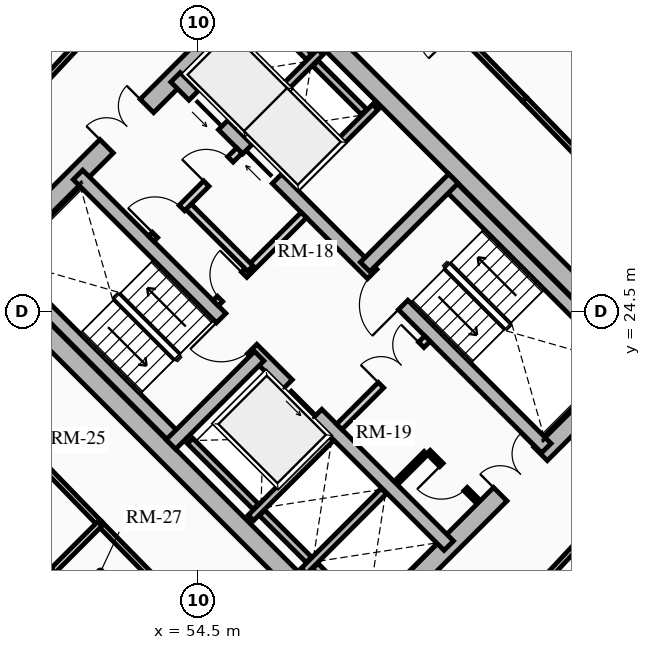
"""IFC4 building model, lengths in metres.
Left out: names, types, materials, properties, quantities, classifications, styles, units other than length and angle.
Written with IfcOpenShell. Run it as: python <this file> out.ifc"""

import sys

from ifc_helpers import new_model, si_unit, direction, frame, frame_2d, origin, place, context, subcontext, project, spatial, rectangle, extrude, source, transform, mapped, element, fill, save


model = new_model("IFC4")
c1 = context("Model", 3, precision=1e-05, world=origin(), true_north=direction((0.0, 1.0)))
c2 = subcontext(c1, "Body", "Model", "MODEL_VIEW")
j1 = project(units=[si_unit("LENGTHUNIT", "METRE"), si_unit("PLANEANGLEUNIT", "RADIAN")], contexts=[c1])
p1 = place(None, origin())
s1 = spatial("IfcSite", under=j1, at=p1, CompositionType="ELEMENT")
p2 = place(p1, origin())
s2 = spatial("IfcBuilding", under=s1, at=p2, CompositionType="ELEMENT")
p3 = place(p2, frame((0.0, 0.0, 22.0)))
s3 = spatial("IfcBuildingStorey", under=s2, at=p3, CompositionType="ELEMENT", Elevation=22.0)
for number, where, z_axis, x_axis in (
    (1, (58.773, 15.661, 0.0), (0.0, 0.0, 1.0), (-0.707, 0.707, 0.0)),
    (2, (66.339, 23.227, 0.0), (0.0, 0.0, 1.0), (-0.707, 0.707, 0.0)),
):
    element("IfcWall", number, at=place(p3, frame(where, z_axis=z_axis, x_axis=x_axis)), inside=s3, PredefinedType="SHEAR", context=c2, shape_type="SweptSolid", body=[
        extrude(rectangle(XDim=14.3, YDim=0.5, at=frame_2d((7.15, 0.0))), origin(), (0.0, 0.0, 1.0), 2.91),
    ])
p4 = place(p3, frame((58.596, 15.838, 0.0), z_axis=(0.0, 0.0, 1.0), x_axis=(0.707106781187, 0.707106781187, 0.0)))
e3 = element("IfcWall", 3, at=p4, inside=s3, PredefinedType="SHEAR", context=c2, shape_type="SweptSolid", body=[
    extrude(rectangle(XDim=10.7, YDim=0.5, at=frame_2d((5.35, 0.0))), origin(), (0.0, 0.0, 1.0), 2.91),
])
m1 = source(origin(), c2, "Body", "SweptSolid", [
    extrude(rectangle(XDim=1.5, YDim=2.02, at=frame_2d((0.75, 1.01))), frame((0.0, 0.26, 0.0), z_axis=(0.0, -1.0, 0.0), x_axis=(1.0, 0.0, 0.0)), (0.0, 0.0, 1.0), 0.52),
])
p5 = place(p4, frame((5.45, 0.0, 0.0)))
e4 = element("IfcOpeningElement", 4, at=p5, cuts=e3, PredefinedType="OPENING", context=c2, shape_type="MappedRepresentation", body=[
    mapped(m1, transform((0.0, 0.0, 0.0), x_axis=(1.0, 0.0, 0.0), y_axis=(0.0, 1.0, 0.0), z_axis=(0.0, 0.0, 1.0), scale=1.0)),
])
p6 = place(p3, frame((48.838, 25.596, 0.0), z_axis=(0.0, 0.0, 1.0), x_axis=(0.707106781187, 0.707106781187, 0.0)))
e5 = element("IfcWall", 5, at=p6, inside=s3, PredefinedType="SHEAR", context=c2, shape_type="SweptSolid", body=[
    extrude(rectangle(XDim=10.7, YDim=0.5, at=frame_2d((5.35, 0.0))), origin(), (0.0, 0.0, 1.0), 2.91),
])
p7 = place(p6, frame((4.6, 0.0, 0.0)))
e6 = element("IfcOpeningElement", 6, at=p7, cuts=e5, PredefinedType="OPENING", context=c2, shape_type="MappedRepresentation", body=[
    mapped(m1, transform((0.0, 0.0, 0.0), x_axis=(1.0, 0.0, 0.0), y_axis=(0.0, 1.0, 0.0), z_axis=(0.0, 0.0, 1.0), scale=1.0)),
])
p8 = place(p3, frame((61.096, 18.338, 0.0), z_axis=(0.0, 0.0, 1.0), x_axis=(-0.707106781187, 0.707106781187, 0.0)))
e7 = element("IfcWall", 7, at=p8, inside=s3, PredefinedType="SHEAR", context=c2, shape_type="SweptSolid", body=[
    extrude(rectangle(XDim=13.8, YDim=0.35, at=frame_2d((6.9, 0.0))), origin(), (0.0, 0.0, 1.0), 2.91),
])
m2 = source(origin(), c2, "Body", "SweptSolid", [
    extrude(rectangle(XDim=1.1, YDim=2.015, at=frame_2d((0.55, 1.007))), frame((0.0, 0.185, 0.0), z_axis=(0.0, -1.0, 0.0), x_axis=(1.0, 0.0, 0.0)), (0.0, 0.0, 1.0), 0.37),
])
p9 = place(p8, frame((4.9, 0.0, 0.0)))
e8 = element("IfcOpeningElement", 8, at=p9, cuts=e7, PredefinedType="OPENING", context=c2, shape_type="MappedRepresentation", body=[
    mapped(m2, transform((0.0, 0.0, 0.0), x_axis=(1.0, 0.0, 0.0), y_axis=(0.0, 1.0, 0.0), z_axis=(0.0, 0.0, 1.0), scale=1.0)),
])
m3 = source(origin(), c2, "Body", "SweptSolid", [
    extrude(rectangle(XDim=1.15, YDim=2.02, at=frame_2d((0.575, 1.01))), frame((0.0, 0.185, 0.0), z_axis=(0.0, -1.0, 0.0), x_axis=(1.0, 0.0, 0.0)), (0.0, 0.0, 1.0), 0.37),
])
p10 = place(p8, frame((7.32, 0.0, 0.0)))
e9 = element("IfcOpeningElement", 9, at=p10, cuts=e7, PredefinedType="OPENING", context=c2, shape_type="MappedRepresentation", body=[
    mapped(m3, transform((0.0, 0.0, 0.0), x_axis=(1.0, 0.0, 0.0), y_axis=(0.0, 1.0, 0.0), z_axis=(0.0, 0.0, 1.0), scale=1.0)),
])
p11 = place(p3, frame((63.662, 20.904, 0.0), z_axis=(0.0, 0.0, 1.0), x_axis=(-0.707106781187, 0.707106781187, 0.0)))
e10 = element("IfcWall", 10, at=p11, inside=s3, PredefinedType="SHEAR", context=c2, shape_type="SweptSolid", body=[
    extrude(rectangle(XDim=13.8, YDim=0.35, at=frame_2d((6.9, 0.0))), origin(), (0.0, 0.0, 1.0), 2.91),
])
p12 = place(p11, frame((10.025, 0.0, 0.0)))
e11 = element("IfcOpeningElement", 11, at=p12, cuts=e10, PredefinedType="OPENING", context=c2, shape_type="MappedRepresentation", body=[
    mapped(m2, transform((0.0, 0.0, 0.0), x_axis=(1.0, 0.0, 0.0), y_axis=(0.0, 1.0, 0.0), z_axis=(0.0, 0.0, 1.0), scale=1.0)),
])
p13 = place(p11, frame((12.025, 0.0, 0.0)))
e12 = element("IfcOpeningElement", 12, at=p13, cuts=e10, PredefinedType="OPENING", context=c2, shape_type="MappedRepresentation", body=[
    mapped(m2, transform((0.0, 0.0, 0.0), x_axis=(1.0, 0.0, 0.0), y_axis=(0.0, 1.0, 0.0), z_axis=(0.0, 0.0, 1.0), scale=1.0)),
])
p14 = place(p11, frame((5.33, 0.0, 0.0)))
e13 = element("IfcOpeningElement", 13, at=p14, cuts=e10, PredefinedType="OPENING", context=c2, shape_type="MappedRepresentation", body=[
    mapped(m3, transform((0.0, 0.0, 0.0), x_axis=(1.0, 0.0, 0.0), y_axis=(0.0, 1.0, 0.0), z_axis=(0.0, 0.0, 1.0), scale=1.0)),
])
p15 = place(p3, frame((53.922, 21.141, 0.0), z_axis=(0.0, 0.0, 1.0), x_axis=(-0.707106781187, 0.707106781187, 0.0)))
e14 = element("IfcWall", 14, at=p15, inside=s3, PredefinedType="SHEAR", context=c2, shape_type="SweptSolid", body=[
    extrude(rectangle(XDim=6.745, YDim=0.35, at=frame_2d((3.373, 0.0))), origin(), (0.0, 0.0, 1.0), 2.91),
])
p16 = place(p3, frame((53.784, 21.003, 0.0), z_axis=(0.0, 0.0, 1.0), x_axis=(0.707106781187, 0.707106781187, 0.0)))
e15 = element("IfcWall", 15, at=p16, inside=s3, PredefinedType="SHEAR", context=c2, shape_type="SweptSolid", body=[
    extrude(rectangle(XDim=3.285, YDim=0.35, at=frame_2d((1.643, 0.0))), origin(), (0.0, 0.0, 1.0), 2.91),
])
p17 = place(p3, frame((65.847, 23.089, 0.0), z_axis=(0.0, 0.0, 1.0), x_axis=(-0.707106781187, 0.707106781187, 0.0)))
e16 = element("IfcWall", 16, at=p17, inside=s3, PredefinedType="SHEAR", context=c2, shape_type="SweptSolid", body=[
    extrude(rectangle(XDim=6.745, YDim=0.35, at=frame_2d((3.373, 0.0))), origin(), (0.0, 0.0, 1.0), 2.91),
])
p18 = place(p3, frame((58.893, 25.674, 0.0), z_axis=(0.0, 0.0, 1.0), x_axis=(0.707106781187, 0.707106781187, 0.0)))
e17 = element("IfcWall", 17, at=p18, inside=s3, PredefinedType="SHEAR", context=c2, shape_type="SweptSolid", body=[
    extrude(rectangle(XDim=3.285, YDim=0.35, at=frame_2d((1.643, 0.0))), origin(), (0.0, 0.0, 1.0), 2.91),
])
p19 = place(p3, frame((55.888, 19.069, 0.0), z_axis=(0.0, 0.0, 1.0), x_axis=(0.707106781187, 0.707106781187, 0.0)))
e18 = element("IfcWall", 18, at=p19, inside=s3, PredefinedType="SHEAR", context=c2, shape_type="SweptSolid", body=[
    extrude(rectangle(XDim=2.97, YDim=0.2, at=frame_2d((1.485, 0.0))), origin(), (0.0, 0.0, 1.0), 2.91),
])
p20 = place(p3, frame((56.015, 19.366, 0.0), z_axis=(0.0, 0.0, 1.0), x_axis=(-0.707106781187, 0.707106781187, 0.0)))
e19 = element("IfcWall", 19, at=p20, inside=s3, PredefinedType="SHEAR", context=c2, shape_type="SweptSolid", body=[
    extrude(rectangle(XDim=2.44, YDim=0.2, at=frame_2d((1.22, 0.0))), origin(), (0.0, 0.0, 1.0), 2.91),
])
p21 = place(p3, frame((57.284, 17.673, 0.0), z_axis=(0.0, 0.0, 1.0), x_axis=(0.707147878904, 0.70706568108, 0.0)))
e20 = element("IfcWall", 20, at=p21, inside=s3, PredefinedType="SHEAR", context=c2, shape_type="SweptSolid", body=[
    extrude(rectangle(XDim=2.97, YDim=0.2, at=frame_2d((1.485, 0.0))), origin(), (0.0, 0.0, 1.0), 2.91),
])
p22 = place(p3, frame((57.412, 17.97, 0.0), z_axis=(0.0, 0.0, 1.0), x_axis=(-0.707106781187, 0.707106781187, 0.0)))
e21 = element("IfcWall", 21, at=p22, inside=s3, PredefinedType="SHEAR", context=c2, shape_type="SweptSolid", body=[
    extrude(rectangle(XDim=1.735, YDim=0.2, at=frame_2d((0.867, 0.0))), origin(), (0.0, 0.0, 1.0), 2.91),
])
p23 = place(p3, frame((58.737, 16.644, 0.0), z_axis=(0.0, 0.0, 1.0), x_axis=(-0.707032117043, 0.707181437447, 0.0)))
e22 = element("IfcWall", 22, at=p23, inside=s3, PredefinedType="SHEAR", context=c2, shape_type="SweptSolid", body=[
    extrude(rectangle(XDim=1.635, YDim=0.2, at=frame_2d((0.817, 0.0))), origin(), (0.0, 0.0, 1.0), 2.91),
])
p24 = place(p3, frame((57.062, 27.781, 0.0), z_axis=(0.0, 0.0, 1.0), x_axis=(0.707106781187, 0.707106781187, 0.0)))
e23 = element("IfcWall", 23, at=p24, inside=s3, PredefinedType="SHEAR", context=c2, shape_type="SweptSolid", body=[
    extrude(rectangle(XDim=2.97, YDim=0.2, at=frame_2d((1.485, 0.0))), origin(), (0.0, 0.0, 1.0), 2.91),
])
p25 = place(p3, frame((55.615, 29.227, 0.0), z_axis=(0.0, 0.0, 1.0), x_axis=(0.707147878904, 0.70706568108, 0.0)))
e24 = element("IfcWall", 24, at=p25, inside=s3, PredefinedType="SHEAR", context=c2, shape_type="SweptSolid", body=[
    extrude(rectangle(XDim=2.97, YDim=0.2, at=frame_2d((1.485, 0.0))), origin(), (0.0, 0.0, 1.0), 2.91),
])
p26 = place(p3, frame((58.865, 29.754, 0.0), z_axis=(0.0, 0.0, 1.0), x_axis=(-0.707174411312, 0.707039144592, 0.0)))
e25 = element("IfcWall", 25, at=p26, inside=s3, PredefinedType="SHEAR", context=c2, shape_type="SweptSolid", body=[
    extrude(rectangle(XDim=1.805, YDim=0.2, at=frame_2d((0.902, 0.0))), origin(), (0.0, 0.0, 1.0), 2.91),
])
p27 = place(p3, frame((57.419, 31.2, 0.0), z_axis=(0.0, 0.0, 1.0), x_axis=(-0.707032117043, 0.707181437447, 0.0)))
e26 = element("IfcWall", 26, at=p27, inside=s3, PredefinedType="SHEAR", context=c2, shape_type="SweptSolid", body=[
    extrude(rectangle(XDim=1.635, YDim=0.2, at=frame_2d((0.817, 0.0))), origin(), (0.0, 0.0, 1.0), 2.91),
])
p28 = place(p3, frame((58.214, 21.467, 0.0), z_axis=(0.0, 0.0, 1.0), x_axis=(0.707106781187, 0.707106781187, 0.0)))
e27 = element("IfcWall", 27, at=p28, inside=s3, PredefinedType="PARTITIONING", context=c2, shape_type="SweptSolid", body=[
    extrude(rectangle(XDim=3.28, YDim=0.2, at=frame_2d((1.64, 0.0))), origin(), (0.0, 0.0, 1.0), 2.635),
])
m4 = source(origin(), c2, "Body", "SweptSolid", [
    extrude(rectangle(XDim=1.5, YDim=2.02, at=frame_2d((0.75, 1.01))), frame((0.0, 0.11, 0.0), z_axis=(0.0, -1.0, 0.0), x_axis=(1.0, 0.0, 0.0)), (0.0, 0.0, 1.0), 0.22),
])
p29 = place(p28, frame((1.55, 0.0, 0.0)))
e28 = element("IfcOpeningElement", 28, at=p29, cuts=e27, PredefinedType="OPENING", context=c2, shape_type="MappedRepresentation", body=[
    mapped(m4, transform((0.0, 0.0, 0.0), x_axis=(1.0, 0.0, 0.0), y_axis=(0.0, 1.0, 0.0), z_axis=(0.0, 0.0, 1.0), scale=1.0)),
])
p30 = place(p3, frame((54.961, 24.719, 0.0), z_axis=(0.0, 0.0, 1.0), x_axis=(0.707106781187, 0.707106781187, 0.0)))
e29 = element("IfcWall", 29, at=p30, inside=s3, PredefinedType="PARTITIONING", context=c2, shape_type="SweptSolid", body=[
    extrude(rectangle(XDim=3.28, YDim=0.2, at=frame_2d((1.64, 0.0))), origin(), (0.0, 0.0, 1.0), 2.635),
])
m5 = source(origin(), c2, "Body", "SweptSolid", [
    extrude(rectangle(XDim=0.9, YDim=2.005, at=frame_2d((0.45, 1.002))), frame((0.0, 0.11, 0.0), z_axis=(0.0, -1.0, 0.0), x_axis=(1.0, 0.0, 0.0)), (0.0, 0.0, 1.0), 0.22),
])
p31 = place(p30, frame((0.16, 0.0, 0.0)))
e30 = element("IfcOpeningElement", 30, at=p31, cuts=e29, PredefinedType="OPENING", context=c2, shape_type="MappedRepresentation", body=[
    mapped(m5, transform((0.0, 0.0, 0.0), x_axis=(1.0, 0.0, 0.0), y_axis=(0.0, 1.0, 0.0), z_axis=(0.0, 0.0, 1.0), scale=1.0)),
])
p32 = place(p3, frame((55.874, 25.631, 0.0), z_axis=(0.0, 0.0, 1.0), x_axis=(-0.707157639372, 0.707055919343, 0.0)))
e31 = element("IfcWall", 31, at=p32, inside=s3, PredefinedType="PARTITIONING", context=c2, shape_type="SweptSolid", body=[
    extrude(rectangle(XDim=2.4, YDim=0.2, at=frame_2d((1.2, 0.0))), origin(), (0.0, 0.0, 1.0), 2.635),
])
p33 = place(p3, frame((53.264, 26.416, 0.0), z_axis=(0.0, 0.0, 1.0), x_axis=(0.707106781187, 0.707106781187, 0.0)))
e32 = element("IfcWall", 32, at=p33, inside=s3, PredefinedType="PARTITIONING", context=c2, shape_type="SweptSolid", body=[
    extrude(rectangle(XDim=3.28, YDim=0.2, at=frame_2d((1.64, 0.0))), origin(), (0.0, 0.0, 1.0), 2.635),
])
m6 = source(origin(), c2, "Body", "SweptSolid", [
    extrude(rectangle(XDim=1.0, YDim=2.015, at=frame_2d((0.5, 1.007))), frame((0.0, 0.11, 0.0), z_axis=(0.0, -1.0, 0.0), x_axis=(1.0, 0.0, 0.0)), (0.0, 0.0, 1.0), 0.22),
])
p34 = place(p33, frame((0.14, 0.0, 0.0)))
e33 = element("IfcOpeningElement", 33, at=p34, cuts=e32, PredefinedType="OPENING", context=c2, shape_type="MappedRepresentation", body=[
    mapped(m6, transform((0.0, 0.0, 0.0), x_axis=(1.0, 0.0, 0.0), y_axis=(0.0, 1.0, 0.0), z_axis=(0.0, 0.0, 1.0), scale=1.0)),
])
p35 = place(p33, frame((2.05, 0.0, 0.0)))
e34 = element("IfcOpeningElement", 34, at=p35, cuts=e32, PredefinedType="OPENING", context=c2, shape_type="MappedRepresentation", body=[
    mapped(m5, transform((0.0, 0.0, 0.0), x_axis=(1.0, 0.0, 0.0), y_axis=(0.0, 1.0, 0.0), z_axis=(0.0, 0.0, 1.0), scale=1.0)),
])
p36 = place(p3, frame((61.835, 19.529, 0.0), z_axis=(0.0, 0.0, 1.0), x_axis=(-0.707174592913, 0.707038962956, 0.0)))
e35 = element("IfcWall", 35, at=p36, inside=s3, PredefinedType="PARTITIONING", context=c2, shape_type="SweptSolid", body=[
    extrude(rectangle(XDim=1.8, YDim=0.125, at=frame_2d((0.9, 0.0))), origin(), (0.0, 0.0, 1.0), 2.635),
])
m7 = source(origin(), c2, "Body", "SweptSolid", [
    extrude(rectangle(XDim=0.9, YDim=2.005, at=frame_2d((0.45, 1.002))), frame((0.0, 0.073, 0.0), z_axis=(0.0, -1.0, 0.0), x_axis=(1.0, 0.0, 0.0)), (0.0, 0.0, 1.0), 0.145),
])
p37 = place(p36, frame((0.42, 0.0, 0.0)))
e36 = element("IfcOpeningElement", 36, at=p37, cuts=e35, PredefinedType="OPENING", context=c2, shape_type="MappedRepresentation", body=[
    mapped(m7, transform((0.0, 0.0, 0.0), x_axis=(1.0, 0.0, 0.0), y_axis=(0.0, 1.0, 0.0), z_axis=(0.0, 0.0, 1.0), scale=1.0)),
])
p38 = place(p3, frame((59.713, 19.996, 0.0), z_axis=(0.0, 0.0, 1.0), x_axis=(0.707217726, 0.706995818963, 0.0)))
e37 = element("IfcWall", 37, at=p38, inside=s3, PredefinedType="PARTITIONING", context=c2, shape_type="SweptSolid", body=[
    extrude(rectangle(XDim=1.1, YDim=0.125, at=frame_2d((0.55, 0.0))), origin(), (0.0, 0.0, 1.0), 2.635),
])
p39 = place(p3, frame((63.086, 30.086, 0.0), z_axis=(0.0, 0.0, 1.0), x_axis=(-0.699075897379, 0.715047473741, 0.0)))
e38 = element("IfcWall", 38, at=p39, inside=s3, PredefinedType="PARTITIONING", context=c2, shape_type="SweptSolid", body=[
    extrude(rectangle(XDim=6.114, YDim=0.15, at=frame_2d((3.057, 0.0))), origin(), (0.0, 0.0, 1.0), 2.159),
])
m8 = source(origin(), c2, "Body", "SweptSolid", [
    extrude(rectangle(XDim=1.05, YDim=2.015, at=frame_2d((0.525, 1.007))), frame((0.0, 0.085, 0.0), z_axis=(0.0, -1.0, 0.0), x_axis=(1.0, 0.0, 0.0)), (0.0, 0.0, 1.0), 0.17),
])
p40 = place(p39, frame((2.532, 0.0, 0.0)))
e39 = element("IfcOpeningElement", 39, at=p40, cuts=e38, PredefinedType="OPENING", context=c2, shape_type="MappedRepresentation", body=[
    mapped(m8, transform((0.0, 0.0, 0.0), x_axis=(1.0, 0.0, 0.0), y_axis=(0.0, 1.0, 0.0), z_axis=(0.0, 0.0, 1.0), scale=1.0)),
])
p41 = place(p3, frame((52.043, 32.28, 0.0), z_axis=(0.0, 0.0, 1.0), x_axis=(-0.682606081633, -0.730786519661, 0.0)))
e40 = element("IfcWall", 40, at=p41, inside=s3, PredefinedType="PARTITIONING", context=c2, shape_type="SweptSolid", body=[
    extrude(rectangle(XDim=6.527, YDim=0.15, at=frame_2d((3.263, 0.0))), origin(), (0.0, 0.0, 1.0), 2.159),
])
p42 = place(p3, frame((47.706, 23.253, 0.0), z_axis=(0.0, 0.0, 1.0), x_axis=(0.696179266346, -0.717867974707, 0.0)))
e41 = element("IfcWall", 41, at=p42, inside=s3, PredefinedType="PARTITIONING", context=c2, shape_type="SweptSolid", body=[
    extrude(rectangle(XDim=6.045, YDim=0.15, at=frame_2d((3.022, 0.0))), origin(), (0.0, 0.0, 1.0), 2.635),
])
p43 = place(p3, frame((51.914, 18.914, 0.0), z_axis=(0.0, 0.0, 1.0), x_axis=(0.699999313799, -0.714143515465, 0.0)))
e42 = element("IfcWall", 42, at=p43, inside=s3, PredefinedType="PARTITIONING", context=c2, shape_type="SweptSolid", body=[
    extrude(rectangle(XDim=6.162, YDim=0.15, at=frame_2d((3.081, 0.0))), origin(), (0.0, 0.0, 1.0), 2.159),
])
p44 = place(p3, frame((62.903, 16.667, 0.0), z_axis=(0.0, 0.0, 1.0), x_axis=(0.682371947497, 0.731005147225, 0.0)))
e43 = element("IfcWall", 43, at=p44, inside=s3, PredefinedType="PARTITIONING", context=c2, shape_type="SweptSolid", body=[
    extrude(rectangle(XDim=6.642, YDim=0.15, at=frame_2d((3.321, 0.0))), origin(), (0.0, 0.0, 1.0), 2.159),
])
p45 = place(p3, frame((67.27, 25.78, 0.0), z_axis=(0.0, 0.0, 1.0), x_axis=(-0.696847842907, 0.717218992942, 0.0)))
e44 = element("IfcWall", 44, at=p45, inside=s3, PredefinedType="PARTITIONING", context=c2, shape_type="SweptSolid", body=[
    extrude(rectangle(XDim=6.004, YDim=0.15, at=frame_2d((3.002, 0.0))), origin(), (0.0, 0.0, 1.0), 2.635),
])
p46 = place(p3, frame((51.914, 18.914, 0.0), z_axis=(0.0, 0.0, 1.0), x_axis=(-0.707106781187, -0.707106781187, 0.0)))
e45 = element("IfcWall", 45, at=p46, inside=s3, PredefinedType="PARTITIONING", context=c2, shape_type="SweptSolid", body=[
    extrude(rectangle(XDim=6.431, YDim=0.16, at=frame_2d((3.215, 0.0))), origin(), (0.0, 0.0, 1.0), 2.073),
])
p47 = place(p3, frame((46.676, 21.978, 0.0), z_axis=(0.0, 0.0, 1.0), x_axis=(0.67473816271, -0.738057187339, 0.0)))
e46 = element("IfcWall", 46, at=p47, inside=s3, PredefinedType="PARTITIONING", context=c2, shape_type="SweptSolid", body=[
    extrude(rectangle(XDim=5.876, YDim=0.125, at=frame_2d((2.938, 0.0))), origin(), (0.0, 0.0, 1.0), 2.635),
])
m9 = source(origin(), c2, "Body", "SweptSolid", [
    extrude(rectangle(XDim=1.1, YDim=2.015, at=frame_2d((0.55, 1.007))), frame((0.0, 0.025, 0.0), z_axis=(0.0, -1.0, 0.0), x_axis=(1.0, 0.0, 0.0)), (0.0, 0.0, 1.0), 0.05),
])
p48 = place(p9, origin())
e47 = element("IfcDoor", 47, at=p48, inside=s3, OperationType="SLIDING_TO_LEFT", PredefinedType="DOOR", context=c2, shape_type="MappedRepresentation", body=[
    mapped(m9, transform((0.0, 0.0, 0.0), x_axis=(1.0, 0.0, 0.0), y_axis=(0.0, 1.0, 0.0), z_axis=(0.0, 0.0, 1.0), scale=1.0)),
])
fill(e8, e47)
p49 = place(p12, origin())
e48 = element("IfcDoor", 48, at=p49, inside=s3, OperationType="SLIDING_TO_RIGHT", PredefinedType="DOOR", context=c2, shape_type="MappedRepresentation", body=[
    mapped(m9, transform((0.0, 0.0, 0.0), x_axis=(1.0, 0.0, 0.0), y_axis=(0.0, 1.0, 0.0), z_axis=(0.0, 0.0, 1.0), scale=1.0)),
])
fill(e11, e48)
p50 = place(p13, origin())
e49 = element("IfcDoor", 49, at=p50, inside=s3, OperationType="SLIDING_TO_LEFT", PredefinedType="DOOR", context=c2, shape_type="MappedRepresentation", body=[
    mapped(m9, transform((0.0, 0.0, 0.0), x_axis=(1.0, 0.0, 0.0), y_axis=(0.0, 1.0, 0.0), z_axis=(0.0, 0.0, 1.0), scale=1.0)),
])
fill(e12, e49)
m10 = source(origin(), c2, "Body", "SweptSolid", [
    extrude(rectangle(XDim=1.15, YDim=2.02, at=frame_2d((0.575, 1.01))), frame((0.0, 0.025, 0.0), z_axis=(0.0, -1.0, 0.0), x_axis=(1.0, 0.0, 0.0)), (0.0, 0.0, 1.0), 0.05),
])
p51 = place(p10, origin())
e50 = element("IfcDoor", 50, at=p51, inside=s3, OperationType="SINGLE_SWING_RIGHT", PredefinedType="DOOR", context=c2, shape_type="MappedRepresentation", body=[
    mapped(m10, transform((0.0, 0.0, 0.0), x_axis=(1.0, 0.0, 0.0), y_axis=(0.0, 1.0, 0.0), z_axis=(0.0, 0.0, 1.0), scale=1.0)),
])
fill(e9, e50)
p52 = place(p14, origin())
e51 = element("IfcDoor", 51, at=p52, inside=s3, OperationType="SINGLE_SWING_LEFT", PredefinedType="DOOR", context=c2, shape_type="MappedRepresentation", body=[
    mapped(m10, transform((0.0, 0.0, 0.0), x_axis=(1.0, 0.0, 0.0), y_axis=(0.0, 1.0, 0.0), z_axis=(0.0, 0.0, 1.0), scale=1.0)),
])
fill(e13, e51)
m11 = source(origin(), c2, "Body", "SweptSolid", [
    extrude(rectangle(XDim=1.5, YDim=2.02, at=frame_2d((0.75, 1.01))), frame((0.0, 0.025, 0.0), z_axis=(0.0, -1.0, 0.0), x_axis=(1.0, 0.0, 0.0)), (0.0, 0.0, 1.0), 0.05),
])
p53 = place(p7, origin())
e52 = element("IfcDoor", 52, at=p53, inside=s3, OperationType="DOUBLE_DOOR_SINGLE_SWING", PredefinedType="DOOR", context=c2, shape_type="MappedRepresentation", body=[
    mapped(m11, transform((0.0, 0.0, 0.0), x_axis=(1.0, 0.0, 0.0), y_axis=(0.0, 1.0, 0.0), z_axis=(0.0, 0.0, 1.0), scale=1.0)),
])
fill(e6, e52)
p54 = place(p5, origin())
e53 = element("IfcDoor", 53, at=p54, inside=s3, OperationType="DOUBLE_DOOR_SINGLE_SWING", PredefinedType="DOOR", context=c2, shape_type="MappedRepresentation", body=[
    mapped(m11, transform((0.0, 0.0, 0.0), x_axis=(1.0, 0.0, 0.0), y_axis=(0.0, 1.0, 0.0), z_axis=(0.0, 0.0, 1.0), scale=1.0)),
])
fill(e4, e53)
p55 = place(p29, origin())
e54 = element("IfcDoor", 54, at=p55, inside=s3, OperationType="DOUBLE_DOOR_SINGLE_SWING", PredefinedType="DOOR", context=c2, shape_type="MappedRepresentation", body=[
    mapped(m11, transform((0.0, 0.0, 0.0), x_axis=(1.0, 0.0, 0.0), y_axis=(0.0, 1.0, 0.0), z_axis=(0.0, 0.0, 1.0), scale=1.0)),
])
fill(e28, e54)
m12 = source(origin(), c2, "Body", "SweptSolid", [
    extrude(rectangle(XDim=0.9, YDim=2.005, at=frame_2d((0.45, 1.002))), frame((0.0, 0.025, 0.0), z_axis=(0.0, -1.0, 0.0), x_axis=(1.0, 0.0, 0.0)), (0.0, 0.0, 1.0), 0.05),
])
p56 = place(p31, origin())
e55 = element("IfcDoor", 55, at=p56, inside=s3, OperationType="SINGLE_SWING_RIGHT", PredefinedType="DOOR", context=c2, shape_type="MappedRepresentation", body=[
    mapped(m12, transform((0.0, 0.0, 0.0), x_axis=(1.0, 0.0, 0.0), y_axis=(0.0, 1.0, 0.0), z_axis=(0.0, 0.0, 1.0), scale=1.0)),
])
fill(e30, e55)
m13 = source(origin(), c2, "Body", "SweptSolid", [
    extrude(rectangle(XDim=1.0, YDim=2.015, at=frame_2d((0.5, 1.007))), frame((0.0, 0.025, 0.0), z_axis=(0.0, -1.0, 0.0), x_axis=(1.0, 0.0, 0.0)), (0.0, 0.0, 1.0), 0.05),
])
p57 = place(p34, origin())
e56 = element("IfcDoor", 56, at=p57, inside=s3, OperationType="SINGLE_SWING_LEFT", PredefinedType="DOOR", context=c2, shape_type="MappedRepresentation", body=[
    mapped(m13, transform((0.0, 0.0, 0.0), x_axis=(1.0, 0.0, 0.0), y_axis=(0.0, 1.0, 0.0), z_axis=(0.0, 0.0, 1.0), scale=1.0)),
])
fill(e33, e56)
p58 = place(p37, origin())
e57 = element("IfcDoor", 57, at=p58, inside=s3, OperationType="SINGLE_SWING_RIGHT", PredefinedType="DOOR", context=c2, shape_type="MappedRepresentation", body=[
    mapped(m12, transform((0.0, 0.0, 0.0), x_axis=(1.0, 0.0, 0.0), y_axis=(0.0, 1.0, 0.0), z_axis=(0.0, 0.0, 1.0), scale=1.0)),
])
fill(e36, e57)
p59 = place(p35, origin())
e58 = element("IfcDoor", 58, at=p59, inside=s3, OperationType="SINGLE_SWING_LEFT", PredefinedType="DOOR", context=c2, shape_type="MappedRepresentation", body=[
    mapped(m12, transform((0.0, 0.0, 0.0), x_axis=(1.0, 0.0, 0.0), y_axis=(0.0, 1.0, 0.0), z_axis=(0.0, 0.0, 1.0), scale=1.0)),
])
fill(e34, e58)
save(model, sys.argv[1])
